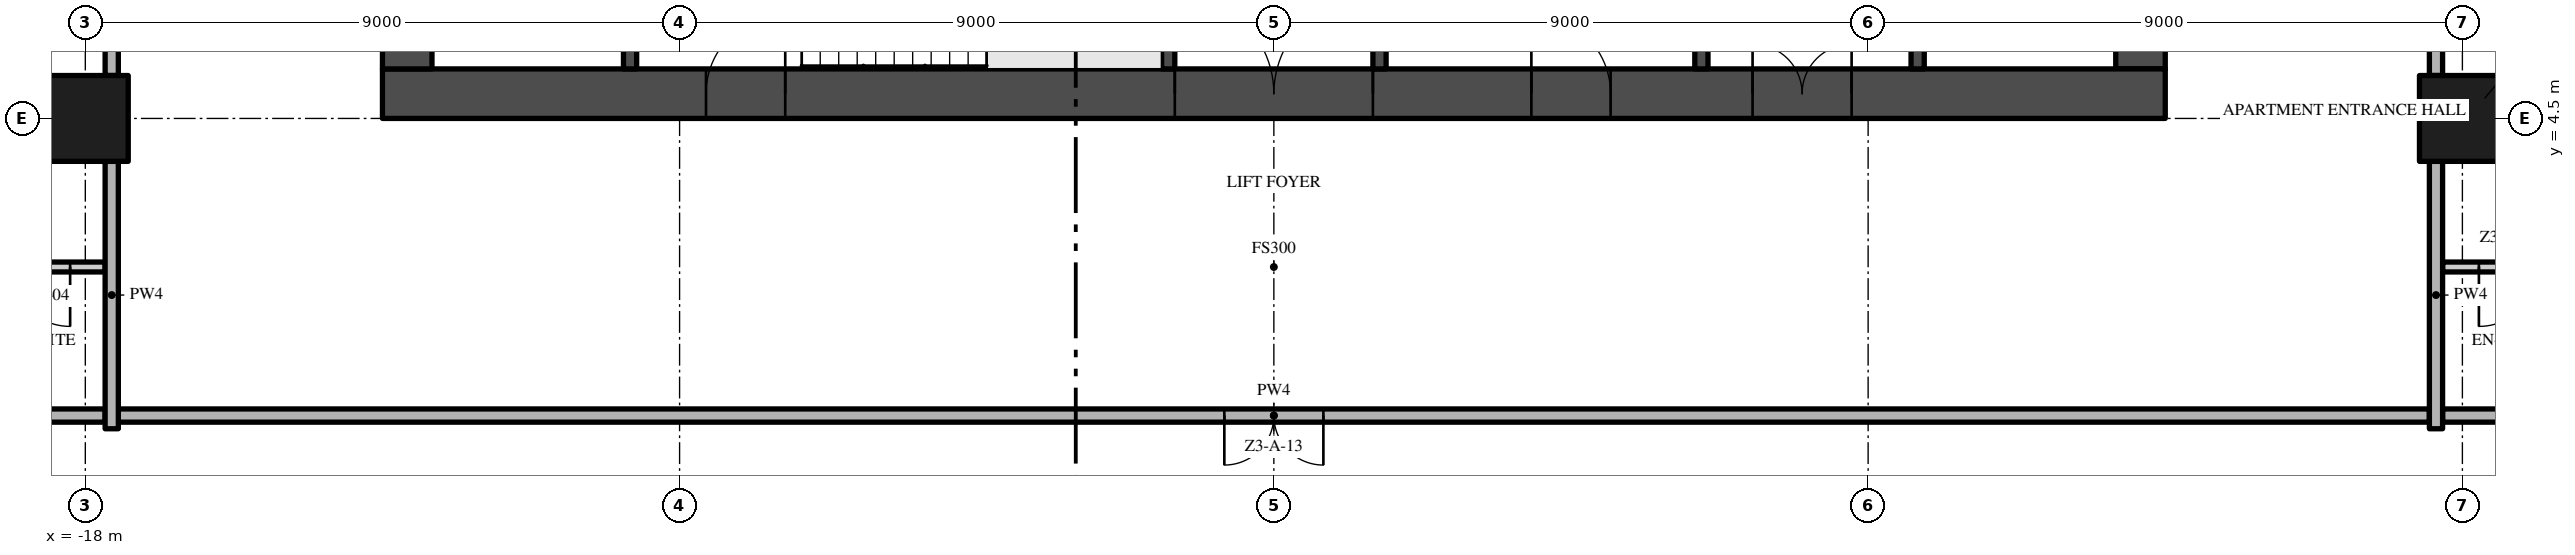
"""IFC4 building model, lengths in metres.
Left out: names, types, materials, properties, quantities, classifications, styles, units other than length and angle.
Written with IfcOpenShell. Run it as: python <this file> out.ifc"""

import sys

from ifc_helpers import new_model, si_unit, direction, frame, frame_2d, origin, origin_2d, place, context, subcontext, project, spatial, rectangle, extrude, element, fill, save


model = new_model("IFC4")
c1 = context("Model", 3, precision=1e-05, world=origin(), true_north=direction((0.0, 1.0)))
c2 = subcontext(c1, "Body", "Model", "MODEL_VIEW")
j1 = project(units=[si_unit("LENGTHUNIT", "METRE"), si_unit("PLANEANGLEUNIT", "RADIAN")], contexts=[c1])
p1 = place(None, origin())
s1 = spatial("IfcSite", under=j1, at=p1, CompositionType="ELEMENT")
p2 = place(p1, origin())
s2 = spatial("IfcBuilding", under=s1, at=p2, CompositionType="ELEMENT")
p3 = place(p2, frame((0.0, 0.0, 132.6)))
s3 = spatial("IfcBuildingStorey", under=s2, at=p3, CompositionType="ELEMENT", Elevation=132.6)
p4 = place(p3, frame((-13.5, 4.875, -0.3), z_axis=(0.0, 0.0, 1.0), x_axis=(1.0, 0.0, 0.0)))
e1 = element("IfcWall", 1, at=p4, inside=s3, PredefinedType="SHEAR", context=c2, shape_type="SweptSolid", body=[
    extrude(rectangle(XDim=27.0, YDim=0.75, at=frame_2d((13.5, 0.0))), origin(), (0.0, 0.0, 1.0), 3.8),
])
p5 = place(p4, frame((12.0, 0.0, 0.3)))
e2 = element("IfcOpeningElement", 2, at=p5, cuts=e1, PredefinedType="OPENING", context=c2, shape_type="SweptSolid", body=[
    extrude(rectangle(XDim=3.0, YDim=2.4, at=frame_2d((1.5, 1.2))), frame((0.0, 0.385, 0.0), z_axis=(0.0, -1.0, 0.0), x_axis=(1.0, 0.0, 0.0)), (0.0, 0.0, 1.0), 0.77),
])
p6 = place(p4, frame((4.9, 0.0, 0.3)))
e3 = element("IfcOpeningElement", 3, at=p6, cuts=e1, PredefinedType="OPENING", context=c2, shape_type="SweptSolid", body=[
    extrude(rectangle(XDim=1.2, YDim=2.2, at=frame_2d((0.6, 1.1))), frame((0.0, 0.385, 0.0), z_axis=(0.0, -1.0, 0.0), x_axis=(1.0, 0.0, 0.0)), (0.0, 0.0, 1.0), 0.77),
])
p7 = place(p4, frame((20.75, 0.0, 0.3)))
e4 = element("IfcOpeningElement", 4, at=p7, cuts=e1, PredefinedType="OPENING", context=c2, shape_type="SweptSolid", body=[
    extrude(rectangle(XDim=1.5, YDim=2.2, at=frame_2d((0.75, 1.1))), frame((0.0, 0.385, 0.0), z_axis=(0.0, -1.0, 0.0), x_axis=(1.0, 0.0, 0.0)), (0.0, 0.0, 1.0), 0.77),
])
p8 = place(p4, frame((17.4, 0.0, 0.3)))
e5 = element("IfcOpeningElement", 5, at=p8, cuts=e1, PredefinedType="OPENING", context=c2, shape_type="SweptSolid", body=[
    extrude(rectangle(XDim=1.2, YDim=2.2, at=frame_2d((0.6, 1.1))), frame((0.0, 0.385, 0.0), z_axis=(0.0, -1.0, 0.0), x_axis=(1.0, 0.0, 0.0)), (0.0, 0.0, 1.0), 0.77),
])
p9 = place(p3, frame((13.125, 5.25, -0.3), z_axis=(0.0, 0.0, 1.0), x_axis=(0.0, 1.0, 0.0)))
e6 = element("IfcWall", 6, at=p9, inside=s3, PredefinedType="SHEAR", context=c2, shape_type="SweptSolid", body=[
    extrude(rectangle(XDim=16.5, YDim=0.75, at=frame_2d((8.25, 0.0))), origin(), (0.0, 0.0, 1.0), 3.8),
])
p10 = place(p9, frame((6.15, 0.0, 0.3)))
e7 = element("IfcOpeningElement", 7, at=p10, cuts=e6, PredefinedType="OPENING", context=c2, shape_type="SweptSolid", body=[
    extrude(rectangle(XDim=1.2, YDim=2.2, at=frame_2d((0.6, 1.1))), frame((0.0, 0.385, 0.0), z_axis=(0.0, -1.0, 0.0), x_axis=(1.0, 0.0, 0.0)), (0.0, 0.0, 1.0), 0.77),
])
p11 = place(p3, frame((-13.125, 21.75, -0.3), z_axis=(0.0, 0.0, 1.0), x_axis=(0.0, -1.0, 0.0)))
e8 = element("IfcWall", 8, at=p11, inside=s3, PredefinedType="SHEAR", context=c2, shape_type="SweptSolid", body=[
    extrude(rectangle(XDim=16.5, YDim=0.75, at=frame_2d((8.25, 0.0))), origin(), (0.0, 0.0, 1.0), 3.8),
])
p12 = place(p11, frame((9.15, 0.0, 0.3)))
e9 = element("IfcOpeningElement", 9, at=p12, cuts=e8, PredefinedType="OPENING", context=c2, shape_type="SweptSolid", body=[
    extrude(rectangle(XDim=1.2, YDim=2.2, at=frame_2d((0.6, 1.1))), frame((0.0, 0.385, 0.0), z_axis=(0.0, -1.0, 0.0), x_axis=(1.0, 0.0, 0.0)), (0.0, 0.0, 1.0), 0.77),
])
for number, where, z_axis, x_axis in (
    (10, (-18.0, 4.5, 0.0), (0.0, 0.0, 1.0), (1.0, 0.0, 0.0)),
    (11, (18.0, 4.5, 0.0), (0.0, 0.0, 1.0), (1.0, 0.0, 0.0)),
):
    element("IfcColumn", number, at=place(p3, frame(where, z_axis=z_axis, x_axis=x_axis)), inside=s3, PredefinedType="COLUMN", context=c2, shape_type="SweptSolid", body=[
        extrude(rectangle(XDim=1.3, YDim=1.3, at=origin_2d()), origin(), (0.0, 0.0, 1.0), 3.5),
    ])
for number, where, z_axis, x_axis in (
    (12, (-9.75, 5.25, 0.0), (0.0, 0.0, 1.0), (0.0, 1.0, 0.0)),
    (13, (-1.6, 5.25, 0.0), (0.0, 0.0, 1.0), (0.0, 1.0, 0.0)),
):
    element("IfcWall", number, at=place(p3, frame(where, z_axis=z_axis, x_axis=x_axis)), inside=s3, PredefinedType="SHEAR", context=c2, shape_type="SweptSolid", body=[
        extrude(rectangle(XDim=2.7, YDim=0.2, at=frame_2d((1.35, 0.0))), origin(), (0.0, 0.0, 1.0), 3.5),
    ])
p13 = place(p3, frame((1.6, 9.2, 0.0), z_axis=(0.0, 0.0, 1.0), x_axis=(0.0, -1.0, 0.0)))
e14 = element("IfcWall", 14, at=p13, inside=s3, PredefinedType="SHEAR", context=c2, shape_type="SweptSolid", body=[
    extrude(rectangle(XDim=3.95, YDim=0.2, at=frame_2d((1.975, 0.0))), origin(), (0.0, 0.0, 1.0), 3.5),
])
p14 = place(p13, frame((1.125, 0.0, 0.0)))
e15 = element("IfcOpeningElement", 15, at=p14, cuts=e14, PredefinedType="OPENING", context=c2, shape_type="SweptSolid", body=[
    extrude(rectangle(XDim=0.9, YDim=2.1, at=frame_2d((0.45, 1.05))), frame((0.0, 0.11, 0.0), z_axis=(0.0, -1.0, 0.0), x_axis=(1.0, 0.0, 0.0)), (0.0, 0.0, 1.0), 0.22),
])
p15 = place(p3, frame((6.475, 5.25, 0.0), z_axis=(0.0, 0.0, 1.0), x_axis=(0.0, 1.0, 0.0)))
e16 = element("IfcWall", 16, at=p15, inside=s3, PredefinedType="SHEAR", context=c2, shape_type="SweptSolid", body=[
    extrude(rectangle(XDim=3.95, YDim=0.2, at=frame_2d((1.975, 0.0))), origin(), (0.0, 0.0, 1.0), 3.5),
])
p16 = place(p3, frame((9.75, 5.25, 0.0), z_axis=(0.0, 0.0, 1.0), x_axis=(0.0, 1.0, 0.0)))
e17 = element("IfcWall", 17, at=p16, inside=s3, PredefinedType="SHEAR", context=c2, shape_type="SweptSolid", body=[
    extrude(rectangle(XDim=2.35, YDim=0.2, at=frame_2d((1.175, 0.0))), origin(), (0.0, 0.0, 1.0), 3.5),
])
p17 = place(p16, frame((0.7, 0.0, 0.0)))
e18 = element("IfcOpeningElement", 18, at=p17, cuts=e17, PredefinedType="OPENING", context=c2, shape_type="SweptSolid", body=[
    extrude(rectangle(XDim=1.1, YDim=2.1, at=frame_2d((0.55, 1.05))), frame((0.0, 0.11, 0.0), z_axis=(0.0, -1.0, 0.0), x_axis=(1.0, 0.0, 0.0)), (0.0, 0.0, 1.0), 0.22),
])
p18 = place(p3, frame((17.5, 0.0, 0.0), z_axis=(0.0, 0.0, 1.0), x_axis=(-1.0, 0.0, 0.0)))
e19 = element("IfcWall", 19, at=p18, inside=s3, PredefinedType="PARTITIONING", context=c2, shape_type="SweptSolid", body=[
    extrude(rectangle(XDim=35.0, YDim=0.2, at=frame_2d((17.5, 0.0))), origin(), (0.0, 0.0, 1.0), 3.5),
])
p19 = place(p18, frame((16.75, 0.0, 0.0)))
e20 = element("IfcOpeningElement", 20, at=p19, cuts=e19, PredefinedType="OPENING", context=c2, shape_type="SweptSolid", body=[
    extrude(rectangle(XDim=1.5, YDim=2.4, at=frame_2d((0.75, 1.2))), frame((0.0, 0.11, 0.0), z_axis=(0.0, -1.0, 0.0), x_axis=(1.0, 0.0, 0.0)), (0.0, 0.0, 1.0), 0.22),
])
for number, where, z_axis, x_axis in (
    (21, (-22.2, 0.0, 0.0), (0.0, 0.0, 1.0), (1.0, 0.0, 0.0)),
    (22, (17.7, 0.0, 0.0), (0.0, 0.0, 1.0), (1.0, 0.0, 0.0)),
):
    element("IfcWall", number, at=place(p3, frame(where, z_axis=z_axis, x_axis=x_axis)), inside=s3, PredefinedType="PARTITIONING", context=c2, shape_type="SweptSolid", body=[
        extrude(rectangle(XDim=4.5, YDim=0.2, at=frame_2d((2.25, 0.0))), origin(), (0.0, 0.0, 1.0), 3.5),
    ])
p20 = place(p3, frame((-17.7, 2.25, 0.0), z_axis=(0.0, 0.0, 1.0), x_axis=(-1.0, 0.0, 0.0)))
e23 = element("IfcWall", 23, at=p20, inside=s3, PredefinedType="PARTITIONING", context=c2, shape_type="SweptSolid", body=[
    extrude(rectangle(XDim=2.03, YDim=0.15, at=frame_2d((1.015, 0.0))), origin(), (0.0, 0.0, 1.0), 3.5),
])
p21 = place(p20, frame((0.53, 0.0, 0.0)))
e24 = element("IfcOpeningElement", 24, at=p21, cuts=e23, PredefinedType="OPENING", context=c2, shape_type="SweptSolid", body=[
    extrude(rectangle(XDim=0.9, YDim=2.1, at=frame_2d((0.45, 1.05))), frame((0.0, 0.085, 0.0), z_axis=(0.0, -1.0, 0.0), x_axis=(1.0, 0.0, 0.0)), (0.0, 0.0, 1.0), 0.17),
])
p22 = place(p3, frame((19.73, 2.25, 0.0), z_axis=(0.0, 0.0, 1.0), x_axis=(-1.0, 0.0, 0.0)))
e25 = element("IfcWall", 25, at=p22, inside=s3, PredefinedType="PARTITIONING", context=c2, shape_type="SweptSolid", body=[
    extrude(rectangle(XDim=2.03, YDim=0.15, at=frame_2d((1.015, 0.0))), origin(), (0.0, 0.0, 1.0), 3.5),
])
p23 = place(p22, frame((0.58, 0.0, 0.0)))
e26 = element("IfcOpeningElement", 26, at=p23, cuts=e25, PredefinedType="OPENING", context=c2, shape_type="SweptSolid", body=[
    extrude(rectangle(XDim=0.9, YDim=2.1, at=frame_2d((0.45, 1.05))), frame((0.0, 0.085, 0.0), z_axis=(0.0, -1.0, 0.0), x_axis=(1.0, 0.0, 0.0)), (0.0, 0.0, 1.0), 0.17),
])
p24 = place(p3, frame((-17.6, -0.2, 0.0), z_axis=(0.0, 0.0, 1.0), x_axis=(0.0, 1.0, 0.0)))
e27 = element("IfcWall", 27, at=p24, inside=s3, PredefinedType="PARTITIONING", context=c2, shape_type="SweptSolid", body=[
    extrude(rectangle(XDim=4.05, YDim=0.2, at=frame_2d((2.025, 0.0))), origin(), (0.0, 0.0, 1.0), 3.5),
])
p25 = place(p3, frame((-17.6, 5.15, 0.0), z_axis=(0.0, 0.0, 1.0), x_axis=(0.0, 1.0, 0.0)))
e28 = element("IfcWall", 28, at=p25, inside=s3, PredefinedType="PARTITIONING", context=c2, shape_type="SweptSolid", body=[
    extrude(rectangle(XDim=7.7, YDim=0.2, at=frame_2d((3.85, 0.0))), origin(), (0.0, 0.0, 1.0), 3.5),
])
p26 = place(p25, frame((1.0, 0.0, 0.0)))
e29 = element("IfcOpeningElement", 29, at=p26, cuts=e28, PredefinedType="OPENING", context=c2, shape_type="SweptSolid", body=[
    extrude(rectangle(XDim=1.2, YDim=2.4, at=frame_2d((0.6, 1.2))), frame((0.0, 0.11, 0.0), z_axis=(0.0, -1.0, 0.0), x_axis=(1.0, 0.0, 0.0)), (0.0, 0.0, 1.0), 0.22),
])
p27 = place(p3, frame((17.6, -0.2, 0.0), z_axis=(0.0, 0.0, 1.0), x_axis=(0.0, 1.0, 0.0)))
e30 = element("IfcWall", 30, at=p27, inside=s3, PredefinedType="PARTITIONING", context=c2, shape_type="SweptSolid", body=[
    extrude(rectangle(XDim=4.05, YDim=0.2, at=frame_2d((2.025, 0.0))), origin(), (0.0, 0.0, 1.0), 3.5),
])
p28 = place(p3, frame((17.6, 12.85, 0.0), z_axis=(0.0, 0.0, 1.0), x_axis=(0.0, -1.0, 0.0)))
e31 = element("IfcWall", 31, at=p28, inside=s3, PredefinedType="PARTITIONING", context=c2, shape_type="SweptSolid", body=[
    extrude(rectangle(XDim=7.7, YDim=0.2, at=frame_2d((3.85, 0.0))), origin(), (0.0, 0.0, 1.0), 3.5),
])
p29 = place(p28, frame((5.5, 0.0, 0.0)))
e32 = element("IfcOpeningElement", 32, at=p29, cuts=e31, PredefinedType="OPENING", context=c2, shape_type="SweptSolid", body=[
    extrude(rectangle(XDim=1.2, YDim=2.4, at=frame_2d((0.6, 1.2))), frame((0.0, 0.11, 0.0), z_axis=(0.0, -1.0, 0.0), x_axis=(1.0, 0.0, 0.0)), (0.0, 0.0, 1.0), 0.22),
])
p30 = place(p5, frame((3.0, 0.0, 0.0), z_axis=(0.0, 0.0, 1.0), x_axis=(-1.0, 0.0, 0.0)))
e33 = element("IfcDoor", 33, at=p30, inside=s3, OperationType="DOUBLE_DOOR_SINGLE_SWING", PredefinedType="DOOR", context=c2, shape_type="SweptSolid", body=[
    extrude(rectangle(XDim=3.0, YDim=2.4, at=frame_2d((1.5, 1.2))), frame((0.0, 0.025, 0.0), z_axis=(0.0, -1.0, 0.0), x_axis=(1.0, 0.0, 0.0)), (0.0, 0.0, 1.0), 0.05),
])
fill(e2, e33)
p31 = place(p6, frame((1.2, 0.0, 0.0), z_axis=(0.0, 0.0, 1.0), x_axis=(-1.0, 0.0, 0.0)))
e34 = element("IfcDoor", 34, at=p31, inside=s3, OperationType="SINGLE_SWING_LEFT", PredefinedType="DOOR", context=c2, shape_type="SweptSolid", body=[
    extrude(rectangle(XDim=1.2, YDim=2.2, at=frame_2d((0.6, 1.1))), frame((0.0, 0.025, 0.0), z_axis=(0.0, -1.0, 0.0), x_axis=(1.0, 0.0, 0.0)), (0.0, 0.0, 1.0), 0.05),
])
fill(e3, e34)
p32 = place(p7, frame((1.5, 0.0, 0.0), z_axis=(0.0, 0.0, 1.0), x_axis=(-1.0, 0.0, 0.0)))
e35 = element("IfcDoor", 35, at=p32, inside=s3, OperationType="DOUBLE_DOOR_SINGLE_SWING", PredefinedType="DOOR", context=c2, shape_type="SweptSolid", body=[
    extrude(rectangle(XDim=1.5, YDim=2.2, at=frame_2d((0.75, 1.1))), frame((0.0, 0.025, 0.0), z_axis=(0.0, -1.0, 0.0), x_axis=(1.0, 0.0, 0.0)), (0.0, 0.0, 1.0), 0.05),
])
fill(e4, e35)
p33 = place(p8, frame((1.2, 0.0, 0.0), z_axis=(0.0, 0.0, 1.0), x_axis=(-1.0, 0.0, 0.0)))
e36 = element("IfcDoor", 36, at=p33, inside=s3, OperationType="SINGLE_SWING_RIGHT", PredefinedType="DOOR", context=c2, shape_type="SweptSolid", body=[
    extrude(rectangle(XDim=1.2, YDim=2.2, at=frame_2d((0.6, 1.1))), frame((0.0, 0.025, 0.0), z_axis=(0.0, -1.0, 0.0), x_axis=(1.0, 0.0, 0.0)), (0.0, 0.0, 1.0), 0.05),
])
fill(e5, e36)
p34 = place(p21, origin())
e37 = element("IfcDoor", 37, at=p34, inside=s3, OperationType="SINGLE_SWING_LEFT", PredefinedType="DOOR", context=c2, shape_type="SweptSolid", body=[
    extrude(rectangle(XDim=0.9, YDim=2.1, at=frame_2d((0.45, 1.05))), frame((0.0, 0.025, 0.0), z_axis=(0.0, -1.0, 0.0), x_axis=(1.0, 0.0, 0.0)), (0.0, 0.0, 1.0), 0.05),
])
fill(e24, e37)
p35 = place(p23, origin())
e38 = element("IfcDoor", 38, at=p35, inside=s3, OperationType="SINGLE_SWING_RIGHT", PredefinedType="DOOR", context=c2, shape_type="SweptSolid", body=[
    extrude(rectangle(XDim=0.9, YDim=2.1, at=frame_2d((0.45, 1.05))), frame((0.0, 0.025, 0.0), z_axis=(0.0, -1.0, 0.0), x_axis=(1.0, 0.0, 0.0)), (0.0, 0.0, 1.0), 0.05),
])
fill(e26, e38)
p36 = place(p19, origin())
e39 = element("IfcDoor", 39, at=p36, inside=s3, OperationType="DOUBLE_DOOR_SINGLE_SWING", PredefinedType="DOOR", context=c2, shape_type="SweptSolid", body=[
    extrude(rectangle(XDim=1.5, YDim=2.4, at=frame_2d((0.75, 1.2))), frame((0.0, 0.025, 0.0), z_axis=(0.0, -1.0, 0.0), x_axis=(1.0, 0.0, 0.0)), (0.0, 0.0, 1.0), 0.05),
])
fill(e20, e39)
save(model, sys.argv[1])
